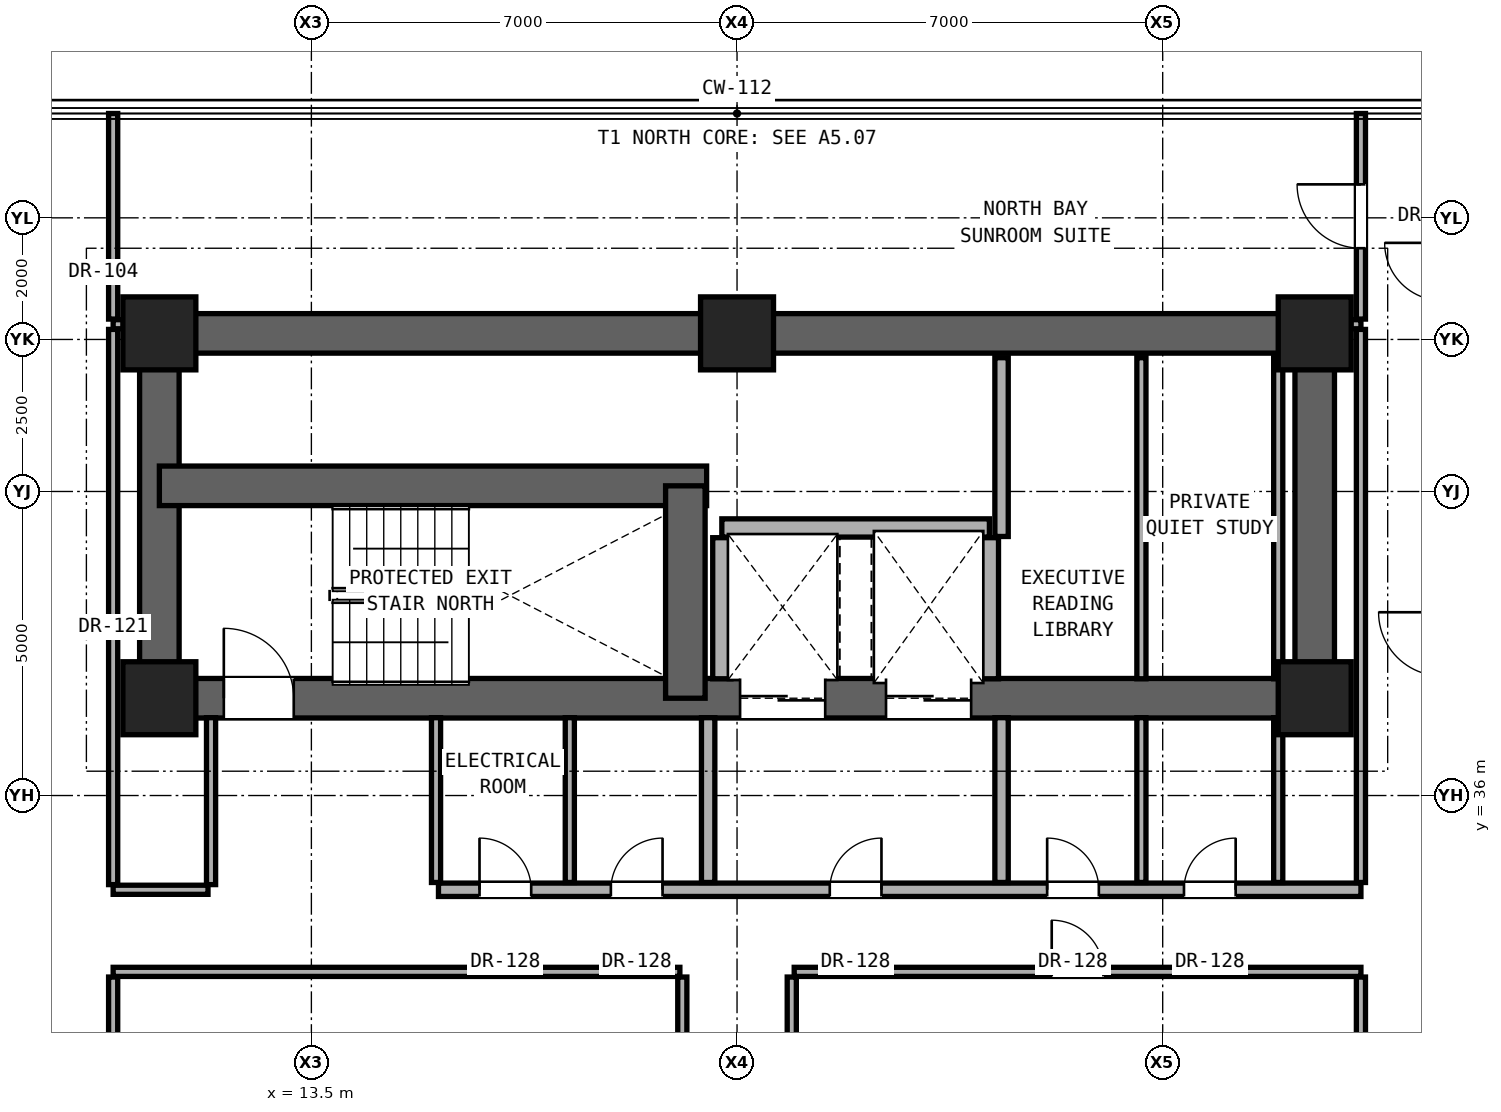
"""IFC4 building model, lengths in metres.
Left out: names, types, materials, properties, quantities, classifications, styles, units other than length and angle.
Written with IfcOpenShell. Run it as: python <this file> out.ifc"""

import sys

from ifc_helpers import new_model, si_unit, direction, frame, frame_2d, origin, origin_2d, place, context, subcontext, project, spatial, rectangle, extrude, element, fill, save


model = new_model("IFC4")
c1 = context("Model", 3, precision=1e-05, world=origin(), true_north=direction((0.0, 1.0)))
c2 = subcontext(c1, "Body", "Model", "MODEL_VIEW")
j1 = project(units=[si_unit("LENGTHUNIT", "METRE"), si_unit("PLANEANGLEUNIT", "RADIAN")], contexts=[c1])
p1 = place(None, origin())
s1 = spatial("IfcSite", under=j1, at=p1, CompositionType="ELEMENT")
p2 = place(p1, origin())
s2 = spatial("IfcBuilding", under=s1, at=p2, CompositionType="ELEMENT")
p3 = place(p2, frame((0.0, 0.0, 111.5)))
s3 = spatial("IfcBuildingStorey", under=s2, at=p3, CompositionType="ELEMENT", Elevation=111.5)
for number, where, z_axis, x_axis in (
    (1, (11.0, 37.6, 0.0), (0.0, 0.0, 1.0), (1.0, 0.0, 0.0)),
    (2, (30.0, 37.6, 0.0), (0.0, 0.0, 1.0), (1.0, 0.0, 0.0)),
    (3, (11.0, 43.6, 0.0), (0.0, 0.0, 1.0), (1.0, 0.0, 0.0)),
    (4, (20.5, 43.6, 0.0), (0.0, 0.0, 1.0), (1.0, 0.0, 0.0)),
    (5, (30.0, 43.6, 0.0), (0.0, 0.0, 1.0), (1.0, 0.0, 0.0)),
):
    element("IfcColumn", number, at=place(p3, frame(where, z_axis=z_axis, x_axis=x_axis)), inside=s3, PredefinedType="COLUMN", context=c2, shape_type="SweptSolid", body=[
        extrude(rectangle(XDim=1.2, YDim=1.2, at=origin_2d()), origin(), (0.0, 0.0, 1.0), 3.3),
    ])
p4 = place(p3, frame((11.0, 43.6, 0.0), z_axis=(0.0, 0.0, 1.0), x_axis=(1.0, 0.0, 0.0)))
e6 = element("IfcWall", 6, at=p4, inside=s3, PredefinedType="SHEAR", context=c2, shape_type="SweptSolid", body=[
    extrude(rectangle(XDim=19.0, YDim=0.65, at=frame_2d((9.5, 0.0))), origin(), (0.0, 0.0, 1.0), 3.08),
])
for number, where, z_axis, x_axis in (
    (7, (11.0, 37.6, 0.0), (0.0, 0.0, 1.0), (0.0, 1.0, 0.0)),
    (8, (30.0, 37.6, 0.0), (0.0, 0.0, 1.0), (0.0, 1.0, 0.0)),
):
    element("IfcWall", number, at=place(p3, frame(where, z_axis=z_axis, x_axis=x_axis)), inside=s3, PredefinedType="SHEAR", context=c2, shape_type="SweptSolid", body=[
        extrude(rectangle(XDim=6.0, YDim=0.65, at=frame_2d((3.0, 0.0))), origin(), (0.0, 0.0, 1.0), 3.08),
    ])
p5 = place(p3, frame((11.0, 37.6, 0.0), z_axis=(0.0, 0.0, 1.0), x_axis=(1.0, 0.0, 0.0)))
e9 = element("IfcWall", 9, at=p5, inside=s3, PredefinedType="SHEAR", context=c2, shape_type="SweptSolid", body=[
    extrude(rectangle(XDim=19.0, YDim=0.65, at=frame_2d((9.5, 0.0))), origin(), (0.0, 0.0, 1.0), 3.08),
])
p6 = place(p5, frame((1.06, 0.0, 0.0)))
e10 = element("IfcOpeningElement", 10, at=p6, cuts=e9, PredefinedType="OPENING", context=c2, shape_type="SweptSolid", body=[
    extrude(rectangle(XDim=1.15, YDim=2.2, at=frame_2d((0.575, 1.1))), frame((0.0, 0.335, 0.0), z_axis=(0.0, -1.0, 0.0), x_axis=(1.0, 0.0, 0.0)), (0.0, 0.0, 1.0), 0.67),
])
p7 = place(p5, frame((9.55, 0.0, 0.0)))
e11 = element("IfcOpeningElement", 11, at=p7, cuts=e9, PredefinedType="OPENING", context=c2, shape_type="SweptSolid", body=[
    extrude(rectangle(XDim=1.4, YDim=2.35, at=frame_2d((0.7, 1.175))), frame((0.0, 0.335, 0.0), z_axis=(0.0, -1.0, 0.0), x_axis=(1.0, 0.0, 0.0)), (0.0, 0.0, 1.0), 0.67),
])
p8 = place(p5, frame((11.95, 0.0, 0.0)))
e12 = element("IfcOpeningElement", 12, at=p8, cuts=e9, PredefinedType="OPENING", context=c2, shape_type="SweptSolid", body=[
    extrude(rectangle(XDim=1.4, YDim=2.35, at=frame_2d((0.7, 1.175))), frame((0.0, 0.335, 0.0), z_axis=(0.0, -1.0, 0.0), x_axis=(1.0, 0.0, 0.0)), (0.0, 0.0, 1.0), 0.67),
])
p9 = place(p3, frame((11.0, 41.093, 0.0), z_axis=(0.0, 0.0, 1.0), x_axis=(1.0, 0.0, 0.0)))
e13 = element("IfcWall", 13, at=p9, inside=s3, PredefinedType="SHEAR", context=c2, shape_type="SweptSolid", body=[
    extrude(rectangle(XDim=9.0, YDim=0.65, at=frame_2d((4.5, 0.0))), origin(), (0.0, 0.0, 1.0), 3.08),
])
p10 = place(p3, frame((19.65, 37.6, 0.0), z_axis=(0.0, 0.0, 1.0), x_axis=(0.0, 1.0, 0.0)))
e14 = element("IfcWall", 14, at=p10, inside=s3, PredefinedType="SHEAR", context=c2, shape_type="SweptSolid", body=[
    extrude(rectangle(XDim=3.493, YDim=0.65, at=frame_2d((1.747, 0.0))), origin(), (0.0, 0.0, 1.0), 3.08),
])
p11 = place(p3, frame((10.24, 33.1, 0.0), z_axis=(0.0, 0.0, 1.0), x_axis=(1.0, 0.0, 0.0)))
e15 = element("IfcWall", 15, at=p11, inside=s3, PredefinedType="PARTITIONING", context=c2, shape_type="SweptSolid", body=[
    extrude(rectangle(XDim=9.32, YDim=0.15, at=frame_2d((4.66, 0.0))), origin(), (0.0, 0.0, 1.0), 2.124),
])
p12 = place(p3, frame((21.44, 33.1, 0.0), z_axis=(0.0, 0.0, 1.0), x_axis=(1.0, 0.0, 0.0)))
e16 = element("IfcWall", 16, at=p12, inside=s3, PredefinedType="PARTITIONING", context=c2, shape_type="SweptSolid", body=[
    extrude(rectangle(XDim=9.32, YDim=0.15, at=frame_2d((4.66, 0.0))), origin(), (0.0, 0.0, 1.0), 2.124),
])
p13 = place(p12, frame((4.235, 0.0, 0.0)))
e17 = element("IfcOpeningElement", 17, at=p13, cuts=e16, PredefinedType="OPENING", context=c2, shape_type="SweptSolid", body=[
    extrude(rectangle(XDim=0.85, YDim=2.01, at=frame_2d((0.425, 1.005))), frame((0.0, 0.085, 0.0), z_axis=(0.0, -1.0, 0.0), x_axis=(1.0, 0.0, 0.0)), (0.0, 0.0, 1.0), 0.17),
])
p14 = place(p3, frame((10.24, 34.45, 0.0), z_axis=(0.0, 0.0, 1.0), x_axis=(1.0, 0.0, 0.0)))
e18 = element("IfcWall", 18, at=p14, inside=s3, PredefinedType="PARTITIONING", context=c2, shape_type="SweptSolid", body=[
    extrude(rectangle(XDim=1.56, YDim=0.15, at=frame_2d((0.78, 0.0))), origin(), (0.0, 0.0, 1.0), 2.124),
])
p15 = place(p3, frame((15.59, 34.45, 0.0), z_axis=(0.0, 0.0, 1.0), x_axis=(1.0, 0.0, 0.0)))
e19 = element("IfcWall", 19, at=p15, inside=s3, PredefinedType="SOLIDWALL", context=c2, shape_type="SweptSolid", body=[
    extrude(rectangle(XDim=15.17, YDim=0.22, at=frame_2d((7.585, 0.0))), origin(), (0.0, 0.0, 1.0), 2.124),
])
p16 = place(p15, frame((6.435, 0.0, 0.0)))
e20 = element("IfcOpeningElement", 20, at=p16, cuts=e19, PredefinedType="OPENING", context=c2, shape_type="SweptSolid", body=[
    extrude(rectangle(XDim=0.85, YDim=2.01, at=frame_2d((0.425, 1.005))), frame((0.0, 0.12, 0.0), z_axis=(0.0, -1.0, 0.0), x_axis=(1.0, 0.0, 0.0)), (0.0, 0.0, 1.0), 0.24),
])
p17 = place(p15, frame((10.01, 0.0, 0.0)))
e21 = element("IfcOpeningElement", 21, at=p17, cuts=e19, PredefinedType="OPENING", context=c2, shape_type="SweptSolid", body=[
    extrude(rectangle(XDim=0.85, YDim=2.01, at=frame_2d((0.425, 1.005))), frame((0.0, 0.12, 0.0), z_axis=(0.0, -1.0, 0.0), x_axis=(1.0, 0.0, 0.0)), (0.0, 0.0, 1.0), 0.24),
])
p18 = place(p15, frame((12.26, 0.0, 0.0)))
e22 = element("IfcOpeningElement", 22, at=p18, cuts=e19, PredefinedType="OPENING", context=c2, shape_type="SweptSolid", body=[
    extrude(rectangle(XDim=0.85, YDim=2.01, at=frame_2d((0.425, 1.005))), frame((0.0, 0.12, 0.0), z_axis=(0.0, -1.0, 0.0), x_axis=(1.0, 0.0, 0.0)), (0.0, 0.0, 1.0), 0.24),
])
p19 = place(p15, frame((0.675, 0.0, 0.0)))
e23 = element("IfcOpeningElement", 23, at=p19, cuts=e19, PredefinedType="OPENING", context=c2, shape_type="SweptSolid", body=[
    extrude(rectangle(XDim=0.85, YDim=2.01, at=frame_2d((0.425, 1.005))), frame((0.0, 0.12, 0.0), z_axis=(0.0, -1.0, 0.0), x_axis=(1.0, 0.0, 0.0)), (0.0, 0.0, 1.0), 0.24),
])
p20 = place(p15, frame((2.835, 0.0, 0.0)))
e24 = element("IfcOpeningElement", 24, at=p20, cuts=e19, PredefinedType="OPENING", context=c2, shape_type="SweptSolid", body=[
    extrude(rectangle(XDim=0.85, YDim=2.01, at=frame_2d((0.425, 1.005))), frame((0.0, 0.12, 0.0), z_axis=(0.0, -1.0, 0.0), x_axis=(1.0, 0.0, 0.0)), (0.0, 0.0, 1.0), 0.24),
])
p21 = place(p3, frame((20.25, 40.4, 0.0), z_axis=(0.0, 0.0, 1.0), x_axis=(1.0, 0.0, 0.0)))
e25 = element("IfcWall", 25, at=p21, inside=s3, PredefinedType="SOLIDWALL", context=c2, shape_type="SweptSolid", body=[
    extrude(rectangle(XDim=4.4, YDim=0.3, at=frame_2d((2.2, 0.0))), origin(), (0.0, 0.0, 1.0), 3.08),
])
for number, where, z_axis, x_axis in (
    (26, (10.24, 43.75, 0.0), (0.0, 0.0, 1.0), (1.0, 0.0, 0.0)),
    (27, (30.32, 43.75, 0.0), (0.0, 0.0, 1.0), (1.0, 0.0, 0.0)),
):
    element("IfcWall", number, at=place(p3, frame(where, z_axis=z_axis, x_axis=x_axis)), inside=s3, PredefinedType="PARTITIONING", context=c2, shape_type="SweptSolid", body=[
        extrude(rectangle(XDim=0.44, YDim=0.15, at=frame_2d((0.22, 0.0))), origin(), (0.0, 0.0, 1.0), 3.08),
    ])
p22 = place(p3, frame((10.24, 27.485, 0.0), z_axis=(0.0, 0.0, 1.0), x_axis=(0.0, 1.0, 0.0)))
e28 = element("IfcWall", 28, at=p22, inside=s3, PredefinedType="PARTITIONING", context=c2, shape_type="SweptSolid", body=[
    extrude(rectangle(XDim=5.53, YDim=0.15, at=frame_2d((2.765, 0.0))), origin(), (0.0, 0.0, 1.0), 2.299),
])
p23 = place(p22, frame((2.29, 0.0, 0.0)))
e29 = element("IfcOpeningElement", 29, at=p23, cuts=e28, PredefinedType="OPENING", context=c2, shape_type="SweptSolid", body=[
    extrude(rectangle(XDim=0.95, YDim=2.15, at=frame_2d((0.475, 1.075))), frame((0.0, 0.085, 0.0), z_axis=(0.0, -1.0, 0.0), x_axis=(1.0, 0.0, 0.0)), (0.0, 0.0, 1.0), 0.17),
])
p24 = place(p3, frame((10.24, 34.535, 0.0), z_axis=(0.0, 0.0, 1.0), x_axis=(0.0, 1.0, 0.0)))
e30 = element("IfcWall", 30, at=p24, inside=s3, PredefinedType="PARTITIONING", context=c2, shape_type="SweptSolid", body=[
    extrude(rectangle(XDim=9.13, YDim=0.15, at=frame_2d((4.565, 0.0))), origin(), (0.0, 0.0, 1.0), 2.456),
])
p25 = place(p3, frame((10.24, 43.835, 0.0), z_axis=(0.0, 0.0, 1.0), x_axis=(0.0, 1.0, 0.0)))
e31 = element("IfcWall", 31, at=p25, inside=s3, PredefinedType="PARTITIONING", context=c2, shape_type="SweptSolid", body=[
    extrude(rectangle(XDim=3.381, YDim=0.15, at=frame_2d((1.69, 0.0))), origin(), (0.0, 0.0, 1.0), 3.08),
])
p26 = place(p3, frame((11.85, 34.535, 0.0), z_axis=(0.0, 0.0, 1.0), x_axis=(0.0, 1.0, 0.0)))
e32 = element("IfcWall", 32, at=p26, inside=s3, PredefinedType="PARTITIONING", context=c2, shape_type="SweptSolid", body=[
    extrude(rectangle(XDim=2.745, YDim=0.15, at=frame_2d((1.373, 0.0))), origin(), (0.0, 0.0, 1.0), 3.08),
])
p27 = place(p3, frame((15.55, 34.57, 0.0), z_axis=(0.0, 0.0, 1.0), x_axis=(0.0, 1.0, 0.0)))
e33 = element("IfcWall", 33, at=p27, inside=s3, PredefinedType="PARTITIONING", context=c2, shape_type="SweptSolid", body=[
    extrude(rectangle(XDim=2.71, YDim=0.15, at=frame_2d((1.355, 0.0))), origin(), (0.0, 0.0, 1.0), 2.609),
])
p28 = place(p3, frame((17.75, 34.57, 0.0), z_axis=(0.0, 0.0, 1.0), x_axis=(0.0, 1.0, 0.0)))
e34 = element("IfcWall", 34, at=p28, inside=s3, PredefinedType="PARTITIONING", context=c2, shape_type="SweptSolid", body=[
    extrude(rectangle(XDim=2.71, YDim=0.15, at=frame_2d((1.355, 0.0))), origin(), (0.0, 0.0, 1.0), 3.08),
])
p29 = place(p3, frame((19.6, 27.485, 0.0), z_axis=(0.0, 0.0, 1.0), x_axis=(0.0, 1.0, 0.0)))
e35 = element("IfcWall", 35, at=p29, inside=s3, PredefinedType="PARTITIONING", context=c2, shape_type="SweptSolid", body=[
    extrude(rectangle(XDim=5.53, YDim=0.15, at=frame_2d((2.765, 0.0))), origin(), (0.0, 0.0, 1.0), 2.124),
])
p30 = place(p3, frame((20.025, 34.57, 0.0), z_axis=(0.0, 0.0, 1.0), x_axis=(0.0, 1.0, 0.0)))
e36 = element("IfcWall", 36, at=p30, inside=s3, PredefinedType="SOLIDWALL", context=c2, shape_type="SweptSolid", body=[
    extrude(rectangle(XDim=2.71, YDim=0.22, at=frame_2d((1.355, 0.0))), origin(), (0.0, 0.0, 1.0), 3.08),
])
p31 = place(p3, frame((20.25, 37.92, 0.0), z_axis=(0.0, 0.0, 1.0), x_axis=(0.0, 1.0, 0.0)))
e37 = element("IfcWall", 37, at=p31, inside=s3, PredefinedType="SOLIDWALL", context=c2, shape_type="SweptSolid", body=[
    extrude(rectangle(XDim=2.32, YDim=0.3, at=frame_2d((1.16, 0.0))), origin(), (0.0, 0.0, 1.0), 3.08),
])
p32 = place(p3, frame((21.4, 27.485, 0.0), z_axis=(0.0, 0.0, 1.0), x_axis=(0.0, 1.0, 0.0)))
e38 = element("IfcWall", 38, at=p32, inside=s3, PredefinedType="PARTITIONING", context=c2, shape_type="SweptSolid", body=[
    extrude(rectangle(XDim=5.53, YDim=0.15, at=frame_2d((2.765, 0.0))), origin(), (0.0, 0.0, 1.0), 2.124),
])
p33 = place(p3, frame((24.65, 37.92, 0.0), z_axis=(0.0, 0.0, 1.0), x_axis=(0.0, 1.0, 0.0)))
e39 = element("IfcWall", 39, at=p33, inside=s3, PredefinedType="SOLIDWALL", context=c2, shape_type="SweptSolid", body=[
    extrude(rectangle(XDim=2.32, YDim=0.3, at=frame_2d((1.16, 0.0))), origin(), (0.0, 0.0, 1.0), 3.08),
])
p34 = place(p3, frame((24.85, 34.57, 0.0), z_axis=(0.0, 0.0, 1.0), x_axis=(0.0, 1.0, 0.0)))
e40 = element("IfcWall", 40, at=p34, inside=s3, PredefinedType="SOLIDWALL", context=c2, shape_type="SweptSolid", body=[
    extrude(rectangle(XDim=2.71, YDim=0.22, at=frame_2d((1.355, 0.0))), origin(), (0.0, 0.0, 1.0), 3.08),
])
p35 = place(p3, frame((24.85, 40.26, 0.0), z_axis=(0.0, 0.0, 1.0), x_axis=(0.0, 1.0, 0.0)))
e41 = element("IfcWall", 41, at=p35, inside=s3, PredefinedType="SOLIDWALL", context=c2, shape_type="SweptSolid", body=[
    extrude(rectangle(XDim=2.94, YDim=0.22, at=frame_2d((1.47, 0.0))), origin(), (0.0, 0.0, 1.0), 3.08),
])
p36 = place(p3, frame((27.15, 34.57, 0.0), z_axis=(0.0, 0.0, 1.0), x_axis=(0.0, 1.0, 0.0)))
e42 = element("IfcWall", 42, at=p36, inside=s3, PredefinedType="PARTITIONING", context=c2, shape_type="SweptSolid", body=[
    extrude(rectangle(XDim=2.71, YDim=0.15, at=frame_2d((1.355, 0.0))), origin(), (0.0, 0.0, 1.0), 3.08),
])
p37 = place(p3, frame((27.15, 37.92, 0.0), z_axis=(0.0, 0.0, 1.0), x_axis=(0.0, 1.0, 0.0)))
e43 = element("IfcWall", 43, at=p37, inside=s3, PredefinedType="PARTITIONING", context=c2, shape_type="SweptSolid", body=[
    extrude(rectangle(XDim=5.28, YDim=0.15, at=frame_2d((2.64, 0.0))), origin(), (0.0, 0.0, 1.0), 3.08),
])
p38 = place(p3, frame((29.4, 34.57, 0.0), z_axis=(0.0, 0.0, 1.0), x_axis=(0.0, 1.0, 0.0)))
e44 = element("IfcWall", 44, at=p38, inside=s3, PredefinedType="PARTITIONING", context=c2, shape_type="SweptSolid", body=[
    extrude(rectangle(XDim=2.71, YDim=0.15, at=frame_2d((1.355, 0.0))), origin(), (0.0, 0.0, 1.0), 3.08),
])
p39 = place(p3, frame((29.4, 37.92, 0.0), z_axis=(0.0, 0.0, 1.0), x_axis=(0.0, 1.0, 0.0)))
e45 = element("IfcWall", 45, at=p39, inside=s3, PredefinedType="PARTITIONING", context=c2, shape_type="SweptSolid", body=[
    extrude(rectangle(XDim=5.28, YDim=0.15, at=frame_2d((2.64, 0.0))), origin(), (0.0, 0.0, 1.0), 3.08),
])
p40 = place(p3, frame((30.76, 27.485, 0.0), z_axis=(0.0, 0.0, 1.0), x_axis=(0.0, 1.0, 0.0)))
e46 = element("IfcWall", 46, at=p40, inside=s3, PredefinedType="PARTITIONING", context=c2, shape_type="SweptSolid", body=[
    extrude(rectangle(XDim=5.53, YDim=0.15, at=frame_2d((2.765, 0.0))), origin(), (0.0, 0.0, 1.0), 2.299),
])
p41 = place(p3, frame((30.76, 34.57, 0.0), z_axis=(0.0, 0.0, 1.0), x_axis=(0.0, 1.0, 0.0)))
e47 = element("IfcWall", 47, at=p41, inside=s3, PredefinedType="PARTITIONING", context=c2, shape_type="SweptSolid", body=[
    extrude(rectangle(XDim=9.095, YDim=0.15, at=frame_2d((4.547, 0.0))), origin(), (0.0, 0.0, 1.0), 2.456),
])
p42 = place(p3, frame((30.76, 43.835, 0.0), z_axis=(0.0, 0.0, 1.0), x_axis=(0.0, 1.0, 0.0)))
e48 = element("IfcWall", 48, at=p42, inside=s3, PredefinedType="PARTITIONING", context=c2, shape_type="SweptSolid", body=[
    extrude(rectangle(XDim=3.381, YDim=0.15, at=frame_2d((1.69, 0.0))), origin(), (0.0, 0.0, 1.0), 3.08),
])
p43 = place(p42, frame((1.166, 0.0, 0.0)))
e49 = element("IfcOpeningElement", 49, at=p43, cuts=e48, PredefinedType="OPENING", context=c2, shape_type="SweptSolid", body=[
    extrude(rectangle(XDim=1.05, YDim=2.2, at=frame_2d((0.525, 1.1))), frame((0.0, 0.085, 0.0), z_axis=(0.0, -1.0, 0.0), x_axis=(1.0, 0.0, 0.0)), (0.0, 0.0, 1.0), 0.17),
])
p44 = place(p6, origin())
e50 = element("IfcDoor", 50, at=p44, inside=s3, OperationType="SINGLE_SWING_LEFT", PredefinedType="DOOR", context=c2, shape_type="SweptSolid", body=[
    extrude(rectangle(XDim=1.15, YDim=2.2, at=frame_2d((0.575, 1.1))), frame((0.0, 0.025, 0.0), z_axis=(0.0, -1.0, 0.0), x_axis=(1.0, 0.0, 0.0)), (0.0, 0.0, 1.0), 0.05),
])
fill(e10, e50)
p45 = place(p16, origin())
e51 = element("IfcDoor", 51, at=p45, inside=s3, OperationType="SINGLE_SWING_RIGHT", PredefinedType="DOOR", context=c2, shape_type="SweptSolid", body=[
    extrude(rectangle(XDim=0.85, YDim=2.01, at=frame_2d((0.425, 1.005))), frame((0.0, 0.025, 0.0), z_axis=(0.0, -1.0, 0.0), x_axis=(1.0, 0.0, 0.0)), (0.0, 0.0, 1.0), 0.05),
])
fill(e20, e51)
p46 = place(p17, origin())
e52 = element("IfcDoor", 52, at=p46, inside=s3, OperationType="SINGLE_SWING_LEFT", PredefinedType="DOOR", context=c2, shape_type="SweptSolid", body=[
    extrude(rectangle(XDim=0.85, YDim=2.01, at=frame_2d((0.425, 1.005))), frame((0.0, 0.025, 0.0), z_axis=(0.0, -1.0, 0.0), x_axis=(1.0, 0.0, 0.0)), (0.0, 0.0, 1.0), 0.05),
])
fill(e21, e52)
p47 = place(p18, origin())
e53 = element("IfcDoor", 53, at=p47, inside=s3, OperationType="SINGLE_SWING_RIGHT", PredefinedType="DOOR", context=c2, shape_type="SweptSolid", body=[
    extrude(rectangle(XDim=0.85, YDim=2.01, at=frame_2d((0.425, 1.005))), frame((0.0, 0.025, 0.0), z_axis=(0.0, -1.0, 0.0), x_axis=(1.0, 0.0, 0.0)), (0.0, 0.0, 1.0), 0.05),
])
fill(e22, e53)
p48 = place(p19, origin())
e54 = element("IfcDoor", 54, at=p48, inside=s3, OperationType="SINGLE_SWING_LEFT", PredefinedType="DOOR", context=c2, shape_type="SweptSolid", body=[
    extrude(rectangle(XDim=0.85, YDim=2.01, at=frame_2d((0.425, 1.005))), frame((0.0, 0.025, 0.0), z_axis=(0.0, -1.0, 0.0), x_axis=(1.0, 0.0, 0.0)), (0.0, 0.0, 1.0), 0.05),
])
fill(e23, e54)
p49 = place(p20, origin())
e55 = element("IfcDoor", 55, at=p49, inside=s3, OperationType="SINGLE_SWING_RIGHT", PredefinedType="DOOR", context=c2, shape_type="SweptSolid", body=[
    extrude(rectangle(XDim=0.85, YDim=2.01, at=frame_2d((0.425, 1.005))), frame((0.0, 0.025, 0.0), z_axis=(0.0, -1.0, 0.0), x_axis=(1.0, 0.0, 0.0)), (0.0, 0.0, 1.0), 0.05),
])
fill(e24, e55)
p50 = place(p13, origin())
e56 = element("IfcDoor", 56, at=p50, inside=s3, OperationType="SINGLE_SWING_LEFT", PredefinedType="DOOR", context=c2, shape_type="SweptSolid", body=[
    extrude(rectangle(XDim=0.85, YDim=2.01, at=frame_2d((0.425, 1.005))), frame((0.0, 0.025, 0.0), z_axis=(0.0, -1.0, 0.0), x_axis=(1.0, 0.0, 0.0)), (0.0, 0.0, 1.0), 0.05),
])
fill(e17, e56)
p51 = place(p43, origin())
e57 = element("IfcDoor", 57, at=p51, inside=s3, OperationType="SINGLE_SWING_RIGHT", PredefinedType="DOOR", context=c2, shape_type="SweptSolid", body=[
    extrude(rectangle(XDim=1.05, YDim=2.2, at=frame_2d((0.525, 1.1))), frame((0.0, 0.025, 0.0), z_axis=(0.0, -1.0, 0.0), x_axis=(1.0, 0.0, 0.0)), (0.0, 0.0, 1.0), 0.05),
])
fill(e49, e57)
p52 = place(p7, origin())
e58 = element("IfcDoor", 58, at=p52, inside=s3, OperationType="DOUBLE_DOOR_SLIDING", PredefinedType="DOOR", context=c2, shape_type="SweptSolid", body=[
    extrude(rectangle(XDim=1.4, YDim=2.35, at=frame_2d((0.7, 1.175))), frame((0.0, 0.025, 0.0), z_axis=(0.0, -1.0, 0.0), x_axis=(1.0, 0.0, 0.0)), (0.0, 0.0, 1.0), 0.05),
])
fill(e11, e58)
p53 = place(p8, origin())
e59 = element("IfcDoor", 59, at=p53, inside=s3, OperationType="DOUBLE_DOOR_SLIDING", PredefinedType="DOOR", context=c2, shape_type="SweptSolid", body=[
    extrude(rectangle(XDim=1.4, YDim=2.35, at=frame_2d((0.7, 1.175))), frame((0.0, 0.025, 0.0), z_axis=(0.0, -1.0, 0.0), x_axis=(1.0, 0.0, 0.0)), (0.0, 0.0, 1.0), 0.05),
])
fill(e12, e59)
save(model, sys.argv[1])
